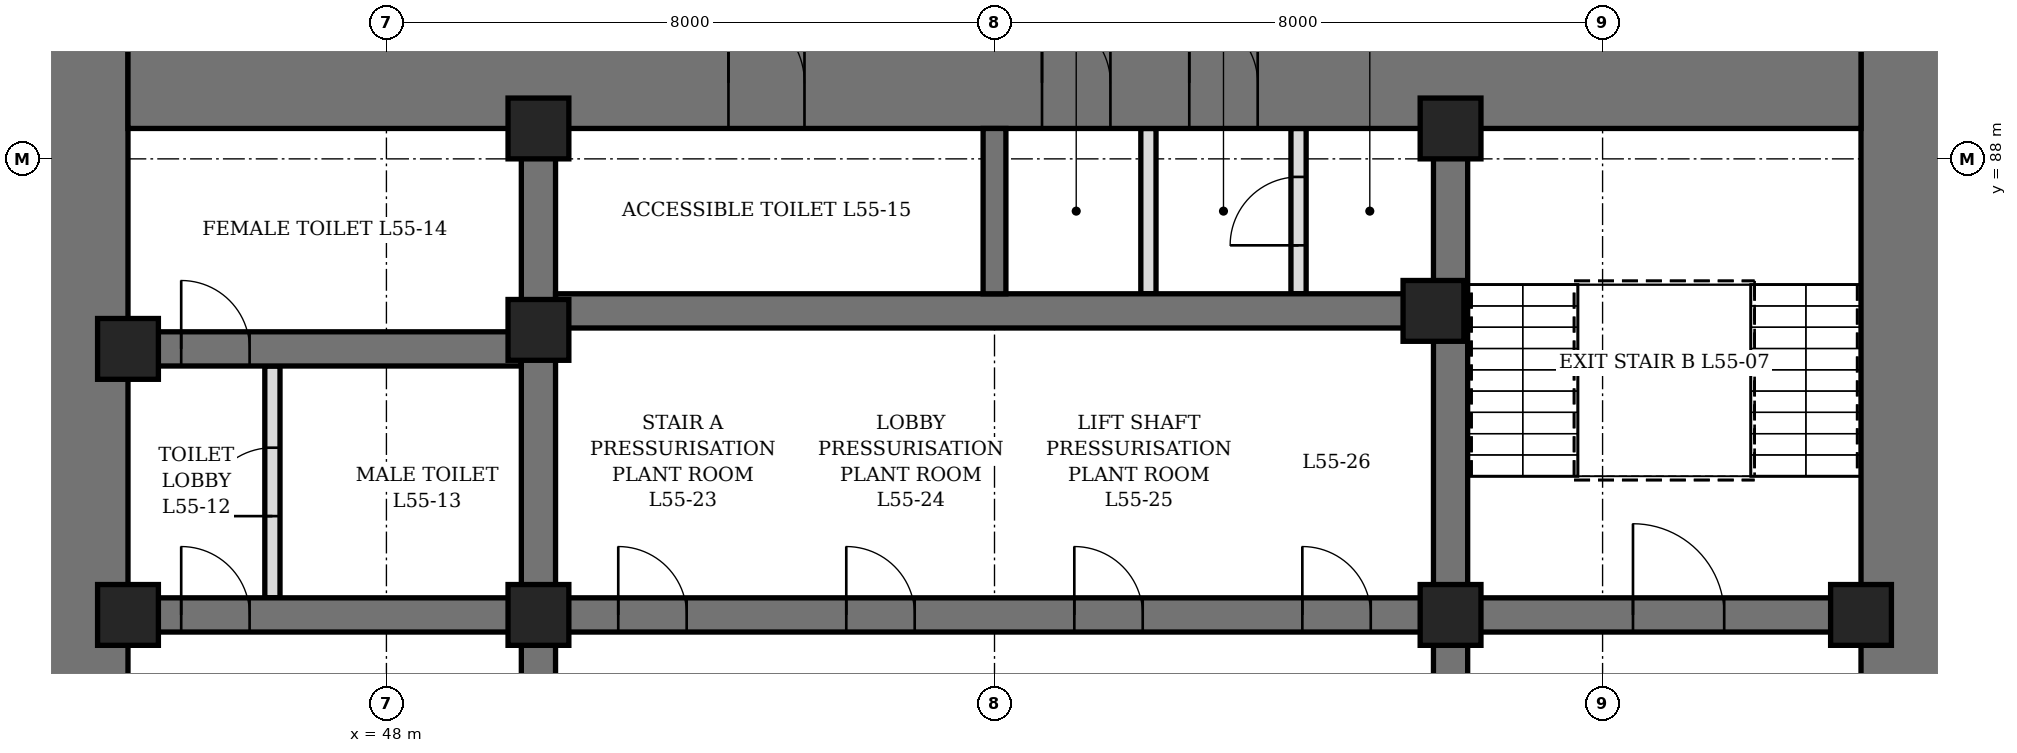
"""IFC4 building model, lengths in metres.
Left out: names, types, materials, properties, quantities, classifications, styles, units other than length and angle.
Written with IfcOpenShell. Run it as: python <this file> out.ifc"""

import sys

from ifc_helpers import new_model, si_unit, direction, frame, frame_2d, origin, origin_2d, place, context, subcontext, project, spatial, rectangle, hollow_rectangle, extrude, element, fill, save


model = new_model("IFC4")
c1 = context("Model", 3, precision=1e-05, world=origin(), true_north=direction((0.0, 1.0)))
c2 = subcontext(c1, "Body", "Model", "MODEL_VIEW")
j1 = project(units=[si_unit("LENGTHUNIT", "METRE"), si_unit("PLANEANGLEUNIT", "RADIAN")], contexts=[c1])
p1 = place(None, origin())
s1 = spatial("IfcSite", under=j1, at=p1, CompositionType="ELEMENT")
p2 = place(p1, origin())
s2 = spatial("IfcBuilding", under=s1, at=p2, CompositionType="ELEMENT")
p3 = place(p2, frame((0.0, 0.0, 244.3)))
s3 = spatial("IfcBuildingStorey", under=s2, at=p3, CompositionType="ELEMENT", Elevation=244.3)
p4 = place(p3, frame((44.0, 70.4, 0.0), z_axis=(0.0, 0.0, 1.0), x_axis=(0.0, 1.0, 0.0)))
e1 = element("IfcWall", 1, at=p4, inside=s3, PredefinedType="SHEAR", context=c2, shape_type="SweptSolid", body=[
    extrude(rectangle(XDim=19.2, YDim=1.2, at=frame_2d((9.6, 0.0))), origin(), (0.0, 0.0, 1.0), 6.0),
])
p5 = place(p4, frame((8.6, 0.0, 0.0)))
e2 = element("IfcOpeningElement", 2, at=p5, cuts=e1, PredefinedType="OPENING", context=c2, shape_type="SweptSolid", body=[
    extrude(rectangle(XDim=2.0, YDim=2.4, at=frame_2d((1.0, 1.2))), frame((0.0, 0.61, 0.0), z_axis=(0.0, -1.0, 0.0), x_axis=(1.0, 0.0, 0.0)), (0.0, 0.0, 1.0), 1.22),
])
p6 = place(p3, frame((68.0, 70.4, 0.0), z_axis=(0.0, 0.0, 1.0), x_axis=(0.0, 1.0, 0.0)))
e3 = element("IfcWall", 3, at=p6, inside=s3, PredefinedType="SHEAR", context=c2, shape_type="SweptSolid", body=[
    extrude(rectangle(XDim=19.2, YDim=1.2, at=frame_2d((9.6, 0.0))), origin(), (0.0, 0.0, 1.0), 6.0),
])
p7 = place(p6, frame((8.6, 0.0, 0.0)))
e4 = element("IfcOpeningElement", 4, at=p7, cuts=e3, PredefinedType="OPENING", context=c2, shape_type="SweptSolid", body=[
    extrude(rectangle(XDim=2.0, YDim=2.4, at=frame_2d((1.0, 1.2))), frame((0.0, 0.61, 0.0), z_axis=(0.0, -1.0, 0.0), x_axis=(1.0, 0.0, 0.0)), (0.0, 0.0, 1.0), 1.22),
])
p8 = place(p3, frame((44.6, 89.0, 0.0), z_axis=(0.0, 0.0, 1.0), x_axis=(1.0, 0.0, 0.0)))
e5 = element("IfcWall", 5, at=p8, inside=s3, PredefinedType="SHEAR", context=c2, shape_type="SweptSolid", body=[
    extrude(rectangle(XDim=22.8, YDim=1.2, at=frame_2d((11.4, 0.0))), origin(), (0.0, 0.0, 1.0), 6.0),
])
p9 = place(p8, frame((7.9, 0.0, 0.0)))
e6 = element("IfcOpeningElement", 6, at=p9, cuts=e5, PredefinedType="OPENING", context=c2, shape_type="SweptSolid", body=[
    extrude(rectangle(XDim=1.0, YDim=2.1, at=frame_2d((0.5, 1.05))), frame((0.0, 0.61, 0.0), z_axis=(0.0, -1.0, 0.0), x_axis=(1.0, 0.0, 0.0)), (0.0, 0.0, 1.0), 1.22),
])
p10 = place(p8, frame((12.025, 0.0, 0.0)))
e7 = element("IfcOpeningElement", 7, at=p10, cuts=e5, PredefinedType="OPENING", context=c2, shape_type="SweptSolid", body=[
    extrude(rectangle(XDim=0.9, YDim=2.1, at=frame_2d((0.45, 1.05))), frame((0.0, 0.61, 0.0), z_axis=(0.0, -1.0, 0.0), x_axis=(1.0, 0.0, 0.0)), (0.0, 0.0, 1.0), 1.22),
])
p11 = place(p8, frame((13.962, 0.0, 0.0)))
e8 = element("IfcOpeningElement", 8, at=p11, cuts=e5, PredefinedType="OPENING", context=c2, shape_type="SweptSolid", body=[
    extrude(rectangle(XDim=0.9, YDim=2.1, at=frame_2d((0.45, 1.05))), frame((0.0, 0.61, 0.0), z_axis=(0.0, -1.0, 0.0), x_axis=(1.0, 0.0, 0.0)), (0.0, 0.0, 1.0), 1.22),
])
p12 = place(p3, frame((50.0, 71.6, 0.0), z_axis=(0.0, 0.0, 1.0), x_axis=(0.0, 1.0, 0.0)))
e9 = element("IfcWall", 9, at=p12, inside=s3, PredefinedType="SHEAR", context=c2, shape_type="SweptSolid", body=[
    extrude(rectangle(XDim=16.8, YDim=0.45, at=frame_2d((8.4, 0.0))), origin(), (0.0, 0.0, 1.0), 6.0),
])
p13 = place(p12, frame((7.5, 0.0, 0.0)))
e10 = element("IfcOpeningElement", 10, at=p13, cuts=e9, PredefinedType="OPENING", context=c2, shape_type="SweptSolid", body=[
    extrude(rectangle(XDim=1.8, YDim=2.4, at=frame_2d((0.9, 1.2))), frame((0.0, 0.235, 0.0), z_axis=(0.0, -1.0, 0.0), x_axis=(1.0, 0.0, 0.0)), (0.0, 0.0, 1.0), 0.47),
])
p14 = place(p3, frame((62.0, 71.6, 0.0), z_axis=(0.0, 0.0, 1.0), x_axis=(0.0, 1.0, 0.0)))
e11 = element("IfcWall", 11, at=p14, inside=s3, PredefinedType="SHEAR", context=c2, shape_type="SweptSolid", body=[
    extrude(rectangle(XDim=16.8, YDim=0.45, at=frame_2d((8.4, 0.0))), origin(), (0.0, 0.0, 1.0), 6.0),
])
p15 = place(p14, frame((7.5, 0.0, 0.0)))
e12 = element("IfcOpeningElement", 12, at=p15, cuts=e11, PredefinedType="OPENING", context=c2, shape_type="SweptSolid", body=[
    extrude(rectangle(XDim=1.8, YDim=2.4, at=frame_2d((0.9, 1.2))), frame((0.0, 0.235, 0.0), z_axis=(0.0, -1.0, 0.0), x_axis=(1.0, 0.0, 0.0)), (0.0, 0.0, 1.0), 0.47),
])
p16 = place(p3, frame((44.6, 82.0, 0.0), z_axis=(0.0, 0.0, 1.0), x_axis=(1.0, 0.0, 0.0)))
e13 = element("IfcWall", 13, at=p16, inside=s3, PredefinedType="SHEAR", context=c2, shape_type="SweptSolid", body=[
    extrude(rectangle(XDim=5.175, YDim=0.45, at=frame_2d((2.587, 0.0))), origin(), (0.0, 0.0, 1.0), 6.0),
])
p17 = place(p16, frame((0.7, 0.0, 0.0)))
e14 = element("IfcOpeningElement", 14, at=p17, cuts=e13, PredefinedType="OPENING", context=c2, shape_type="SweptSolid", body=[
    extrude(rectangle(XDim=0.9, YDim=2.1, at=frame_2d((0.45, 1.05))), frame((0.0, 0.235, 0.0), z_axis=(0.0, -1.0, 0.0), x_axis=(1.0, 0.0, 0.0)), (0.0, 0.0, 1.0), 0.47),
])
p18 = place(p3, frame((44.6, 85.5, 0.0), z_axis=(0.0, 0.0, 1.0), x_axis=(1.0, 0.0, 0.0)))
e15 = element("IfcWall", 15, at=p18, inside=s3, PredefinedType="SHEAR", context=c2, shape_type="SweptSolid", body=[
    extrude(rectangle(XDim=5.175, YDim=0.45, at=frame_2d((2.587, 0.0))), origin(), (0.0, 0.0, 1.0), 6.0),
])
p19 = place(p18, frame((0.7, 0.0, 0.0)))
e16 = element("IfcOpeningElement", 16, at=p19, cuts=e15, PredefinedType="OPENING", context=c2, shape_type="SweptSolid", body=[
    extrude(rectangle(XDim=0.9, YDim=2.1, at=frame_2d((0.45, 1.05))), frame((0.0, 0.235, 0.0), z_axis=(0.0, -1.0, 0.0), x_axis=(1.0, 0.0, 0.0)), (0.0, 0.0, 1.0), 0.47),
])
p20 = place(p3, frame((62.225, 82.0, 0.0), z_axis=(0.0, 0.0, 1.0), x_axis=(1.0, 0.0, 0.0)))
e17 = element("IfcWall", 17, at=p20, inside=s3, PredefinedType="SHEAR", context=c2, shape_type="SweptSolid", body=[
    extrude(rectangle(XDim=5.175, YDim=0.45, at=frame_2d((2.587, 0.0))), origin(), (0.0, 0.0, 1.0), 6.0),
])
p21 = place(p20, frame((2.175, 0.0, 0.0)))
e18 = element("IfcOpeningElement", 18, at=p21, cuts=e17, PredefinedType="OPENING", context=c2, shape_type="SweptSolid", body=[
    extrude(rectangle(XDim=1.2, YDim=2.1, at=frame_2d((0.6, 1.05))), frame((0.0, 0.235, 0.0), z_axis=(0.0, -1.0, 0.0), x_axis=(1.0, 0.0, 0.0)), (0.0, 0.0, 1.0), 0.47),
])
p22 = place(p3, frame((50.225, 82.0, 0.0), z_axis=(0.0, 0.0, 1.0), x_axis=(1.0, 0.0, 0.0)))
e19 = element("IfcWall", 19, at=p22, inside=s3, PredefinedType="SHEAR", context=c2, shape_type="SweptSolid", body=[
    extrude(rectangle(XDim=11.55, YDim=0.45, at=frame_2d((5.775, 0.0))), origin(), (0.0, 0.0, 1.0), 6.0),
])
p23 = place(p22, frame((0.825, 0.0, 0.0)))
e20 = element("IfcOpeningElement", 20, at=p23, cuts=e19, PredefinedType="OPENING", context=c2, shape_type="SweptSolid", body=[
    extrude(rectangle(XDim=0.9, YDim=2.1, at=frame_2d((0.45, 1.05))), frame((0.0, 0.235, 0.0), z_axis=(0.0, -1.0, 0.0), x_axis=(1.0, 0.0, 0.0)), (0.0, 0.0, 1.0), 0.47),
])
p24 = place(p22, frame((3.825, 0.0, 0.0)))
e21 = element("IfcOpeningElement", 21, at=p24, cuts=e19, PredefinedType="OPENING", context=c2, shape_type="SweptSolid", body=[
    extrude(rectangle(XDim=0.9, YDim=2.1, at=frame_2d((0.45, 1.05))), frame((0.0, 0.235, 0.0), z_axis=(0.0, -1.0, 0.0), x_axis=(1.0, 0.0, 0.0)), (0.0, 0.0, 1.0), 0.47),
])
p25 = place(p22, frame((6.825, 0.0, 0.0)))
e22 = element("IfcOpeningElement", 22, at=p25, cuts=e19, PredefinedType="OPENING", context=c2, shape_type="SweptSolid", body=[
    extrude(rectangle(XDim=0.9, YDim=2.1, at=frame_2d((0.45, 1.05))), frame((0.0, 0.235, 0.0), z_axis=(0.0, -1.0, 0.0), x_axis=(1.0, 0.0, 0.0)), (0.0, 0.0, 1.0), 0.47),
])
p26 = place(p22, frame((9.825, 0.0, 0.0)))
e23 = element("IfcOpeningElement", 23, at=p26, cuts=e19, PredefinedType="OPENING", context=c2, shape_type="SweptSolid", body=[
    extrude(rectangle(XDim=0.9, YDim=2.1, at=frame_2d((0.45, 1.05))), frame((0.0, 0.235, 0.0), z_axis=(0.0, -1.0, 0.0), x_axis=(1.0, 0.0, 0.0)), (0.0, 0.0, 1.0), 0.47),
])
p27 = place(p3, frame((50.225, 86.0, 0.0), z_axis=(0.0, 0.0, 1.0), x_axis=(1.0, 0.0, 0.0)))
e24 = element("IfcWall", 24, at=p27, inside=s3, PredefinedType="SHEAR", context=c2, shape_type="SweptSolid", body=[
    extrude(rectangle(XDim=11.55, YDim=0.45, at=frame_2d((5.775, 0.0))), origin(), (0.0, 0.0, 1.0), 6.0),
])
p28 = place(p3, frame((56.0, 86.225, 0.0), z_axis=(0.0, 0.0, 1.0), x_axis=(0.0, 1.0, 0.0)))
e25 = element("IfcWall", 25, at=p28, inside=s3, PredefinedType="SHEAR", context=c2, shape_type="SweptSolid", body=[
    extrude(rectangle(XDim=2.175, YDim=0.3, at=frame_2d((1.087, 0.0))), origin(), (0.0, 0.0, 1.0), 6.0),
])
for number, where, z_axis, x_axis in (
    (26, (44.6, 82.0, 0.0), (0.0, 0.0, 1.0), (1.0, 0.0, 0.0)),
    (27, (44.6, 85.5, 0.0), (0.0, 0.0, 1.0), (1.0, 0.0, 0.0)),
    (28, (50.0, 82.0, 0.0), (0.0, 0.0, 1.0), (1.0, 0.0, 0.0)),
    (29, (50.0, 85.75, 0.0), (0.0, 0.0, 1.0), (1.0, 0.0, 0.0)),
    (30, (50.0, 88.4, 0.0), (0.0, 0.0, 1.0), (1.0, 0.0, 0.0)),
    (31, (61.775, 86.0, 0.0), (0.0, 0.0, 1.0), (1.0, 0.0, 0.0)),
    (32, (62.0, 82.0, 0.0), (0.0, 0.0, 1.0), (1.0, 0.0, 0.0)),
    (33, (62.0, 88.4, 0.0), (0.0, 0.0, 1.0), (1.0, 0.0, 0.0)),
    (34, (67.4, 82.0, 0.0), (0.0, 0.0, 1.0), (1.0, 0.0, 0.0)),
):
    element("IfcColumn", number, at=place(p3, frame(where, z_axis=z_axis, x_axis=x_axis)), inside=s3, PredefinedType="COLUMN", context=c2, shape_type="SweptSolid", body=[
        extrude(hollow_rectangle(XDim=0.8, YDim=0.8, WallThickness=0.1, at=origin_2d()), origin(), (0.0, 0.0, 1.0), 6.0),
    ])
p29 = place(p3, frame((46.5, 82.225, 0.0), z_axis=(0.0, 0.0, 1.0), x_axis=(0.0, 1.0, 0.0)))
e35 = element("IfcWall", 35, at=p29, inside=s3, PredefinedType="PARTITIONING", context=c2, shape_type="SweptSolid", body=[
    extrude(rectangle(XDim=3.05, YDim=0.2, at=frame_2d((1.525, 0.0))), origin(), (0.0, 0.0, 1.0), 5.84),
])
p30 = place(p29, frame((1.075, 0.0, 0.0)))
e36 = element("IfcOpeningElement", 36, at=p30, cuts=e35, PredefinedType="OPENING", context=c2, shape_type="SweptSolid", body=[
    extrude(rectangle(XDim=0.9, YDim=2.1, at=frame_2d((0.45, 1.05))), frame((0.0, 0.11, 0.0), z_axis=(0.0, -1.0, 0.0), x_axis=(1.0, 0.0, 0.0)), (0.0, 0.0, 1.0), 0.22),
])
p31 = place(p3, frame((60.0, 86.225, 0.0), z_axis=(0.0, 0.0, 1.0), x_axis=(0.0, 1.0, 0.0)))
e37 = element("IfcWall", 37, at=p31, inside=s3, PredefinedType="PARTITIONING", context=c2, shape_type="SweptSolid", body=[
    extrude(rectangle(XDim=2.175, YDim=0.2, at=frame_2d((1.087, 0.0))), origin(), (0.0, 0.0, 1.0), 5.84),
])
p32 = place(p31, frame((0.637, 0.0, 0.0)))
e38 = element("IfcOpeningElement", 38, at=p32, cuts=e37, PredefinedType="OPENING", context=c2, shape_type="SweptSolid", body=[
    extrude(rectangle(XDim=0.9, YDim=2.1, at=frame_2d((0.45, 1.05))), frame((0.0, 0.11, 0.0), z_axis=(0.0, -1.0, 0.0), x_axis=(1.0, 0.0, 0.0)), (0.0, 0.0, 1.0), 0.22),
])
p33 = place(p3, frame((58.025, 86.225, 0.0), z_axis=(0.0, 0.0, 1.0), x_axis=(0.0, 1.0, 0.0)))
e39 = element("IfcWall", 39, at=p33, inside=s3, PredefinedType="PARTITIONING", context=c2, shape_type="SweptSolid", body=[
    extrude(rectangle(XDim=2.175, YDim=0.2, at=frame_2d((1.087, 0.0))), origin(), (0.0, 0.0, 1.0), 5.84),
])
p34 = place(p17, origin())
e40 = element("IfcDoor", 40, at=p34, inside=s3, OperationType="SINGLE_SWING_LEFT", PredefinedType="DOOR", context=c2, shape_type="SweptSolid", body=[
    extrude(rectangle(XDim=0.9, YDim=2.1, at=frame_2d((0.45, 1.05))), frame((0.0, 0.225, 0.0), z_axis=(0.0, -1.0, 0.0), x_axis=(1.0, 0.0, 0.0)), (0.0, 0.0, 1.0), 0.449),
])
fill(e14, e40)
p35 = place(p30, origin())
e41 = element("IfcDoor", 41, at=p35, inside=s3, OperationType="SINGLE_SWING_RIGHT", PredefinedType="DOOR", context=c2, shape_type="SweptSolid", body=[
    extrude(rectangle(XDim=0.9, YDim=2.1, at=frame_2d((0.45, 1.05))), frame((0.0, 0.1, 0.0), z_axis=(0.0, -1.0, 0.0), x_axis=(1.0, 0.0, 0.0)), (0.0, 0.0, 1.0), 0.199),
])
fill(e36, e41)
p36 = place(p19, origin())
e42 = element("IfcDoor", 42, at=p36, inside=s3, OperationType="SINGLE_SWING_RIGHT", PredefinedType="DOOR", context=c2, shape_type="SweptSolid", body=[
    extrude(rectangle(XDim=0.9, YDim=2.1, at=frame_2d((0.45, 1.05))), frame((0.0, 0.225, 0.0), z_axis=(0.0, -1.0, 0.0), x_axis=(1.0, 0.0, 0.0)), (0.0, 0.0, 1.0), 0.449),
])
fill(e16, e42)
p37 = place(p9, origin())
e43 = element("IfcDoor", 43, at=p37, inside=s3, OperationType="SINGLE_SWING_LEFT", PredefinedType="DOOR", context=c2, shape_type="SweptSolid", body=[
    extrude(rectangle(XDim=1.0, YDim=2.1, at=frame_2d((0.5, 1.05))), frame((0.0, 0.35, 0.0), z_axis=(0.0, -1.0, 0.0), x_axis=(1.0, 0.0, 0.0)), (0.0, 0.0, 1.0), 0.7),
])
fill(e6, e43)
p38 = place(p10, origin())
e44 = element("IfcDoor", 44, at=p38, inside=s3, OperationType="SINGLE_SWING_LEFT", PredefinedType="DOOR", context=c2, shape_type="SweptSolid", body=[
    extrude(rectangle(XDim=0.9, YDim=2.1, at=frame_2d((0.45, 1.05))), frame((0.0, 0.35, 0.0), z_axis=(0.0, -1.0, 0.0), x_axis=(1.0, 0.0, 0.0)), (0.0, 0.0, 1.0), 0.7),
])
fill(e7, e44)
p39 = place(p11, origin())
e45 = element("IfcDoor", 45, at=p39, inside=s3, OperationType="SINGLE_SWING_LEFT", PredefinedType="DOOR", context=c2, shape_type="SweptSolid", body=[
    extrude(rectangle(XDim=0.9, YDim=2.1, at=frame_2d((0.45, 1.05))), frame((0.0, 0.35, 0.0), z_axis=(0.0, -1.0, 0.0), x_axis=(1.0, 0.0, 0.0)), (0.0, 0.0, 1.0), 0.7),
])
fill(e8, e45)
p40 = place(p32, origin())
e46 = element("IfcDoor", 46, at=p40, inside=s3, OperationType="SINGLE_SWING_LEFT", PredefinedType="DOOR", context=c2, shape_type="SweptSolid", body=[
    extrude(rectangle(XDim=0.9, YDim=2.1, at=frame_2d((0.45, 1.05))), frame((0.0, 0.1, 0.0), z_axis=(0.0, -1.0, 0.0), x_axis=(1.0, 0.0, 0.0)), (0.0, 0.0, 1.0), 0.199),
])
fill(e38, e46)
p41 = place(p23, origin())
e47 = element("IfcDoor", 47, at=p41, inside=s3, OperationType="SINGLE_SWING_LEFT", PredefinedType="DOOR", context=c2, shape_type="SweptSolid", body=[
    extrude(rectangle(XDim=0.9, YDim=2.1, at=frame_2d((0.45, 1.05))), frame((0.0, 0.225, 0.0), z_axis=(0.0, -1.0, 0.0), x_axis=(1.0, 0.0, 0.0)), (0.0, 0.0, 1.0), 0.449),
])
fill(e20, e47)
p42 = place(p24, origin())
e48 = element("IfcDoor", 48, at=p42, inside=s3, OperationType="SINGLE_SWING_LEFT", PredefinedType="DOOR", context=c2, shape_type="SweptSolid", body=[
    extrude(rectangle(XDim=0.9, YDim=2.1, at=frame_2d((0.45, 1.05))), frame((0.0, 0.225, 0.0), z_axis=(0.0, -1.0, 0.0), x_axis=(1.0, 0.0, 0.0)), (0.0, 0.0, 1.0), 0.449),
])
fill(e21, e48)
p43 = place(p25, origin())
e49 = element("IfcDoor", 49, at=p43, inside=s3, OperationType="SINGLE_SWING_LEFT", PredefinedType="DOOR", context=c2, shape_type="SweptSolid", body=[
    extrude(rectangle(XDim=0.9, YDim=2.1, at=frame_2d((0.45, 1.05))), frame((0.0, 0.225, 0.0), z_axis=(0.0, -1.0, 0.0), x_axis=(1.0, 0.0, 0.0)), (0.0, 0.0, 1.0), 0.449),
])
fill(e22, e49)
p44 = place(p26, origin())
e50 = element("IfcDoor", 50, at=p44, inside=s3, OperationType="SINGLE_SWING_LEFT", PredefinedType="DOOR", context=c2, shape_type="SweptSolid", body=[
    extrude(rectangle(XDim=0.9, YDim=2.1, at=frame_2d((0.45, 1.05))), frame((0.0, 0.225, 0.0), z_axis=(0.0, -1.0, 0.0), x_axis=(1.0, 0.0, 0.0)), (0.0, 0.0, 1.0), 0.449),
])
fill(e23, e50)
p45 = place(p21, origin())
e51 = element("IfcDoor", 51, at=p45, inside=s3, OperationType="SINGLE_SWING_LEFT", PredefinedType="DOOR", context=c2, shape_type="SweptSolid", body=[
    extrude(rectangle(XDim=1.2, YDim=2.1, at=frame_2d((0.6, 1.05))), frame((0.0, 0.225, 0.0), z_axis=(0.0, -1.0, 0.0), x_axis=(1.0, 0.0, 0.0)), (0.0, 0.0, 1.0), 0.449),
])
fill(e18, e51)
save(model, sys.argv[1])
